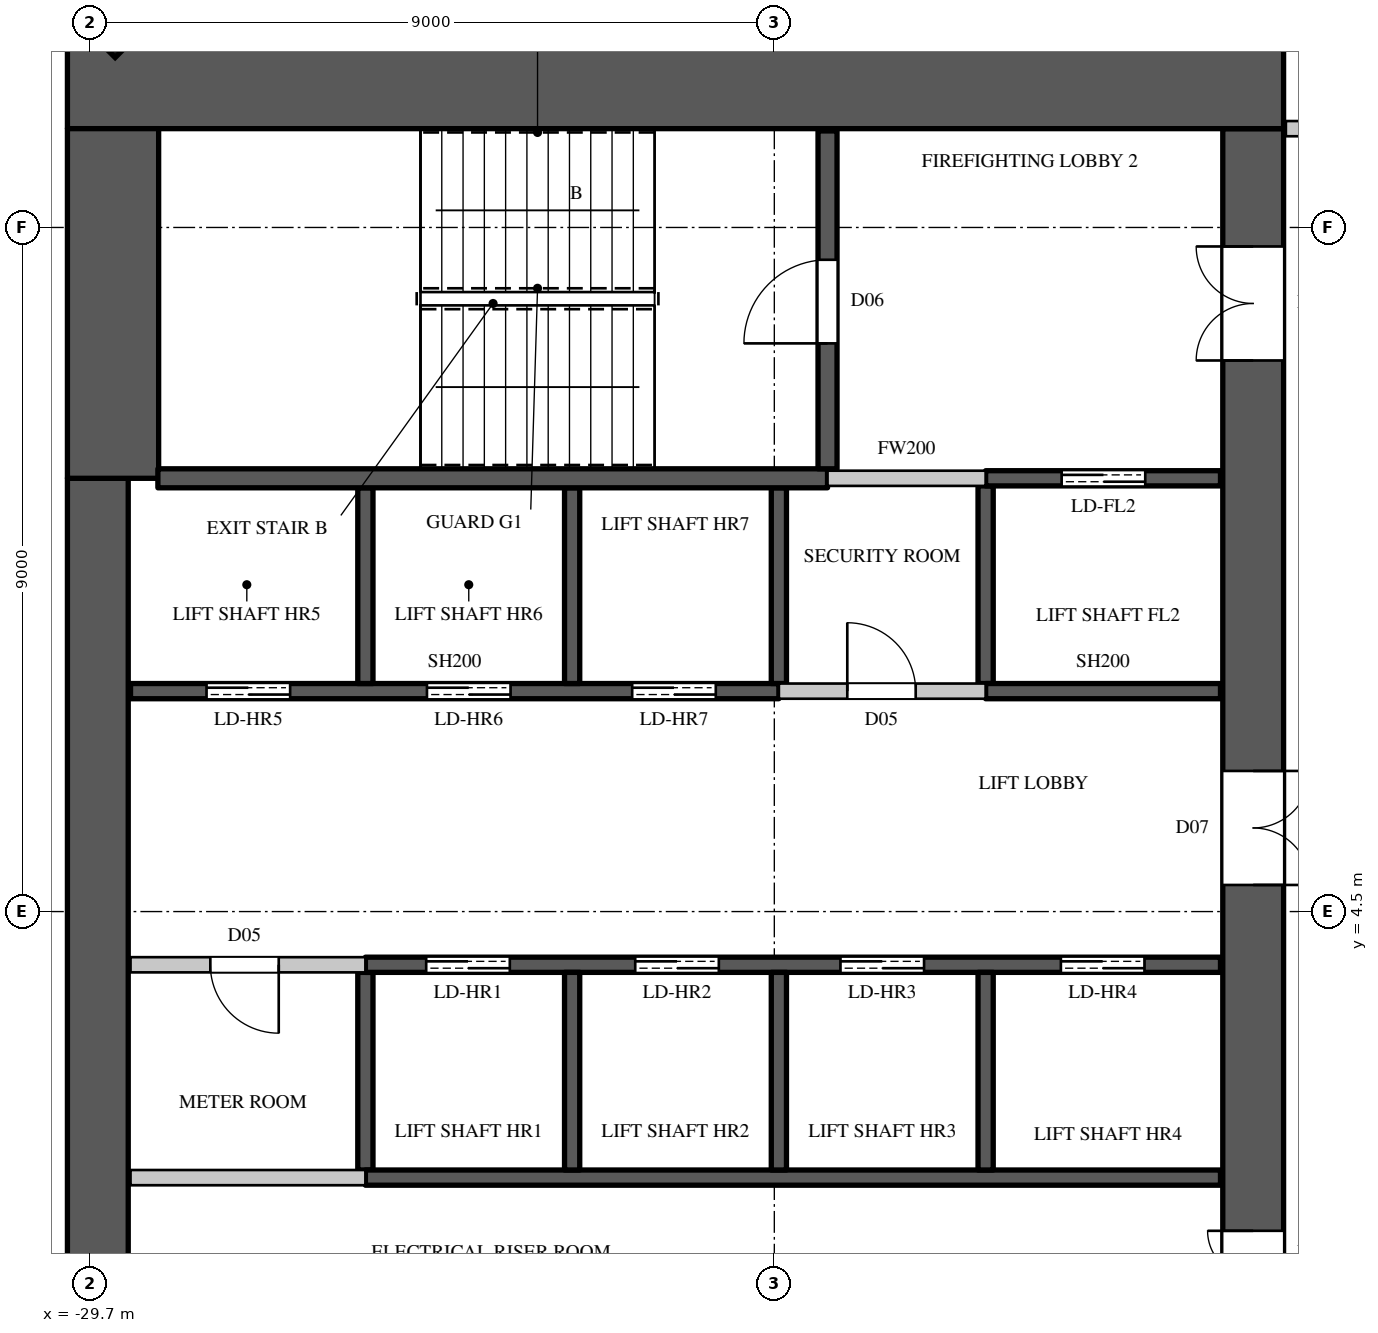
"""IFC4 building model, lengths in metres.
Left out: names, types, materials, properties, quantities, classifications, styles, units other than length and angle.
Written with IfcOpenShell. Run it as: python <this file> out.ifc"""

import sys

from ifc_helpers import new_model, si_unit, direction, frame, frame_2d, origin, origin_2d, place, context, subcontext, project, spatial, rectangle, extrude, element, fill, save


model = new_model("IFC4")
c1 = context("Model", 3, precision=1e-05, world=origin(), true_north=direction((0.0, 1.0)))
c2 = subcontext(c1, "Body", "Model", "MODEL_VIEW")
j1 = project(units=[si_unit("LENGTHUNIT", "METRE"), si_unit("PLANEANGLEUNIT", "RADIAN")], contexts=[c1])
p1 = place(None, origin())
s1 = spatial("IfcSite", under=j1, at=p1, CompositionType="ELEMENT")
p2 = place(p1, origin())
s2 = spatial("IfcBuilding", under=s1, at=p2, CompositionType="ELEMENT")
p3 = place(p2, frame((0.0, 0.0, 209.7)))
s3 = spatial("IfcBuildingStorey", under=s2, at=p3, CompositionType="ELEMENT", Elevation=209.7)
p4 = place(p3, frame((-29.443, 16.443, 0.0), z_axis=(0.0, 0.0, 1.0), x_axis=(-0.707106781187, -0.707106781187, 0.0)))
e1 = element("IfcColumn", 1, at=p4, inside=s3, PredefinedType="COLUMN", context=c2, shape_type="SweptSolid", body=[
    extrude(rectangle(XDim=0.9, YDim=1.1, at=origin_2d()), origin(), (0.0, 0.0, 1.0), 4.1),
])
p5 = place(p3, frame((-30.0, 15.4, 0.0), z_axis=(0.0, 0.0, 1.0), x_axis=(1.0, 0.0, 0.0)))
e2 = element("IfcWall", 2, at=p5, inside=s3, PredefinedType="SHEAR", context=c2, shape_type="SweptSolid", body=[
    extrude(rectangle(XDim=16.0, YDim=1.2, at=frame_2d((8.0, 0.0))), origin(), (0.0, 0.0, 1.0), 4.1),
])
p6 = place(p3, frame((-14.4, -14.8, 0.0), z_axis=(0.0, 0.0, 1.0), x_axis=(0.0, 1.0, 0.0)))
e3 = element("IfcWall", 3, at=p6, inside=s3, PredefinedType="SHEAR", context=c2, shape_type="SweptSolid", body=[
    extrude(rectangle(XDim=29.6, YDim=0.8, at=frame_2d((14.8, 0.0))), origin(), (0.0, 0.0, 1.0), 4.1),
])
p7 = place(p6, frame((1.55, 0.0, 0.0)))
e4 = element("IfcOpeningElement", 4, at=p7, cuts=e3, PredefinedType="OPENING", context=c2, shape_type="SweptSolid", body=[
    extrude(rectangle(XDim=1.5, YDim=2.4, at=frame_2d((0.75, 1.2))), frame((0.0, 0.41, 0.0), z_axis=(0.0, -1.0, 0.0), x_axis=(1.0, 0.0, 0.0)), (0.0, 0.0, 1.0), 0.82),
])
p8 = place(p6, frame((26.55, 0.0, 0.0)))
e5 = element("IfcOpeningElement", 5, at=p8, cuts=e3, PredefinedType="OPENING", context=c2, shape_type="SweptSolid", body=[
    extrude(rectangle(XDim=1.5, YDim=2.4, at=frame_2d((0.75, 1.2))), frame((0.0, 0.41, 0.0), z_axis=(0.0, -1.0, 0.0), x_axis=(1.0, 0.0, 0.0)), (0.0, 0.0, 1.0), 0.82),
])
p9 = place(p6, frame((8.45, 0.0, 0.0)))
e6 = element("IfcOpeningElement", 6, at=p9, cuts=e3, PredefinedType="OPENING", context=c2, shape_type="SweptSolid", body=[
    extrude(rectangle(XDim=1.5, YDim=2.4, at=frame_2d((0.75, 1.2))), frame((0.0, 0.41, 0.0), z_axis=(0.0, -1.0, 0.0), x_axis=(1.0, 0.0, 0.0)), (0.0, 0.0, 1.0), 0.82),
])
p10 = place(p6, frame((19.65, 0.0, 0.0)))
e7 = element("IfcOpeningElement", 7, at=p10, cuts=e3, PredefinedType="OPENING", context=c2, shape_type="SweptSolid", body=[
    extrude(rectangle(XDim=1.5, YDim=2.4, at=frame_2d((0.75, 1.2))), frame((0.0, 0.41, 0.0), z_axis=(0.0, -1.0, 0.0), x_axis=(1.0, 0.0, 0.0)), (0.0, 0.0, 1.0), 0.82),
])
p11 = place(p6, frame((14.5, 0.0, 0.0)))
e8 = element("IfcOpeningElement", 8, at=p11, cuts=e3, PredefinedType="OPENING", context=c2, shape_type="SweptSolid", body=[
    extrude(rectangle(XDim=0.6, YDim=2.0, at=frame_2d((0.3, 1.0))), frame((0.0, 0.41, 0.0), z_axis=(0.0, -1.0, 0.0), x_axis=(1.0, 0.0, 0.0)), (0.0, 0.0, 1.0), 0.82),
])
p12 = place(p3, frame((-29.6, -10.2, 0.0), z_axis=(0.0, 0.0, 1.0), x_axis=(0.0, 1.0, 0.0)))
e9 = element("IfcWall", 9, at=p12, inside=s3, PredefinedType="SHEAR", context=c2, shape_type="SweptSolid", body=[
    extrude(rectangle(XDim=20.4, YDim=0.8, at=frame_2d((10.2, 0.0))), origin(), (0.0, 0.0, 1.0), 4.1),
])
p13 = place(p3, frame((-29.4, 10.2, 0.0), z_axis=(0.0, 0.0, 1.0), x_axis=(0.0, 1.0, 0.0)))
e10 = element("IfcWall", 10, at=p13, inside=s3, PredefinedType="SHEAR", context=c2, shape_type="SweptSolid", body=[
    extrude(rectangle(XDim=4.6, YDim=1.2, at=frame_2d((2.3, 0.0))), origin(), (0.0, 0.0, 1.0), 4.1),
])
p14 = place(p3, frame((-20.64, 7.4, 0.0), z_axis=(0.0, 0.0, 1.0), x_axis=(1.0, 0.0, 0.0)))
e11 = element("IfcWall", 11, at=p14, inside=s3, PredefinedType="PARTITIONING", context=c2, shape_type="SweptSolid", body=[
    extrude(rectangle(XDim=2.72, YDim=0.2, at=frame_2d((1.36, 0.0))), origin(), (0.0, 0.0, 1.0), 3.8),
])
p15 = place(p14, frame((0.9, 0.0, 0.0)))
e12 = element("IfcOpeningElement", 12, at=p15, cuts=e11, PredefinedType="OPENING", context=c2, shape_type="SweptSolid", body=[
    extrude(rectangle(XDim=0.9, YDim=2.2, at=frame_2d((0.45, 1.1))), frame((0.0, 0.11, 0.0), z_axis=(0.0, -1.0, 0.0), x_axis=(1.0, 0.0, 0.0)), (0.0, 0.0, 1.0), 0.22),
])
p16 = place(p3, frame((-20.0, 10.2, 0.0), z_axis=(0.0, 0.0, 1.0), x_axis=(1.0, 0.0, 0.0)))
e13 = element("IfcWall", 13, at=p16, inside=s3, PredefinedType="PARTITIONING", context=c2, shape_type="SweptSolid", body=[
    extrude(rectangle(XDim=2.08, YDim=0.2, at=frame_2d((1.04, 0.0))), origin(), (0.0, 0.0, 1.0), 3.8),
])
p17 = place(p3, frame((-13.97, 14.8, 0.0), z_axis=(0.0, 0.0, 1.0), x_axis=(1.0, 0.0, 0.0)))
e14 = element("IfcWall", 14, at=p17, inside=s3, PredefinedType="PARTITIONING", context=c2, shape_type="SweptSolid", body=[
    extrude(rectangle(XDim=2.87, YDim=0.2, at=frame_2d((1.435, 0.0))), origin(), (0.0, 0.0, 1.0), 3.8),
])
p18 = place(p3, frame((-29.17, 1.0, 0.0), z_axis=(0.0, 0.0, 1.0), x_axis=(1.0, 0.0, 0.0)))
e15 = element("IfcWall", 15, at=p18, inside=s3, PredefinedType="PARTITIONING", context=c2, shape_type="SweptSolid", body=[
    extrude(rectangle(XDim=3.09, YDim=0.2, at=frame_2d((1.545, 0.0))), origin(), (0.0, 0.0, 1.0), 3.8),
])
p19 = place(p3, frame((-29.17, 3.8, 0.0), z_axis=(0.0, 0.0, 1.0), x_axis=(1.0, 0.0, 0.0)))
e16 = element("IfcWall", 16, at=p19, inside=s3, PredefinedType="PARTITIONING", context=c2, shape_type="SweptSolid", body=[
    extrude(rectangle(XDim=3.09, YDim=0.2, at=frame_2d((1.545, 0.0))), origin(), (0.0, 0.0, 1.0), 3.8),
])
p20 = place(p19, frame((1.05, 0.0, 0.0)))
e17 = element("IfcOpeningElement", 17, at=p20, cuts=e16, PredefinedType="OPENING", context=c2, shape_type="SweptSolid", body=[
    extrude(rectangle(XDim=0.9, YDim=2.2, at=frame_2d((0.45, 1.1))), frame((0.0, 0.11, 0.0), z_axis=(0.0, -1.0, 0.0), x_axis=(1.0, 0.0, 0.0)), (0.0, 0.0, 1.0), 0.22),
])
p21 = place(p3, frame((-29.17, 7.4, 0.0), z_axis=(0.0, 0.0, 1.0), x_axis=(1.0, 0.0, 0.0)))
e18 = element("IfcWall", 18, at=p21, inside=s3, PredefinedType="SHEAR", context=c2, shape_type="SweptSolid", body=[
    extrude(rectangle(XDim=8.53, YDim=0.2, at=frame_2d((4.265, 0.0))), origin(), (0.0, 0.0, 1.0), 3.8),
])
p22 = place(p21, frame((1.0, 0.0, 0.0)))
e19 = element("IfcOpeningElement", 19, at=p22, cuts=e18, PredefinedType="OPENING", context=c2, shape_type="SweptSolid", body=[
    extrude(rectangle(XDim=1.1, YDim=2.2, at=frame_2d((0.55, 1.1))), frame((0.0, 0.11, 0.0), z_axis=(0.0, -1.0, 0.0), x_axis=(1.0, 0.0, 0.0)), (0.0, 0.0, 1.0), 0.22),
])
p23 = place(p21, frame((3.9, 0.0, 0.0)))
e20 = element("IfcOpeningElement", 20, at=p23, cuts=e18, PredefinedType="OPENING", context=c2, shape_type="SweptSolid", body=[
    extrude(rectangle(XDim=1.1, YDim=2.2, at=frame_2d((0.55, 1.1))), frame((0.0, 0.11, 0.0), z_axis=(0.0, -1.0, 0.0), x_axis=(1.0, 0.0, 0.0)), (0.0, 0.0, 1.0), 0.22),
])
p24 = place(p21, frame((6.6, 0.0, 0.0)))
e21 = element("IfcOpeningElement", 21, at=p24, cuts=e18, PredefinedType="OPENING", context=c2, shape_type="SweptSolid", body=[
    extrude(rectangle(XDim=1.1, YDim=2.2, at=frame_2d((0.55, 1.1))), frame((0.0, 0.11, 0.0), z_axis=(0.0, -1.0, 0.0), x_axis=(1.0, 0.0, 0.0)), (0.0, 0.0, 1.0), 0.22),
])
p25 = place(p3, frame((-26.08, 1.1, 0.0), z_axis=(0.0, 0.0, 1.0), x_axis=(0.0, 1.0, 0.0)))
e22 = element("IfcWall", 22, at=p25, inside=s3, PredefinedType="SHEAR", context=c2, shape_type="SweptSolid", body=[
    extrude(rectangle(XDim=2.6, YDim=0.2, at=frame_2d((1.3, 0.0))), origin(), (0.0, 0.0, 1.0), 3.8),
])
p26 = place(p3, frame((-26.08, 1.0, 0.0), z_axis=(0.0, 0.0, 1.0), x_axis=(1.0, 0.0, 0.0)))
e23 = element("IfcWall", 23, at=p26, inside=s3, PredefinedType="SHEAR", context=c2, shape_type="SweptSolid", body=[
    extrude(rectangle(XDim=11.25, YDim=0.2, at=frame_2d((5.625, 0.0))), origin(), (0.0, 0.0, 1.0), 3.8),
])
p27 = place(p3, frame((-26.08, 3.8, 0.0), z_axis=(0.0, 0.0, 1.0), x_axis=(1.0, 0.0, 0.0)))
e24 = element("IfcWall", 24, at=p27, inside=s3, PredefinedType="SHEAR", context=c2, shape_type="SweptSolid", body=[
    extrude(rectangle(XDim=11.25, YDim=0.2, at=frame_2d((5.625, 0.0))), origin(), (0.0, 0.0, 1.0), 3.8),
])
p28 = place(p27, frame((0.8, 0.0, 0.0)))
e25 = element("IfcOpeningElement", 25, at=p28, cuts=e24, PredefinedType="OPENING", context=c2, shape_type="SweptSolid", body=[
    extrude(rectangle(XDim=1.1, YDim=2.2, at=frame_2d((0.55, 1.1))), frame((0.0, 0.11, 0.0), z_axis=(0.0, -1.0, 0.0), x_axis=(1.0, 0.0, 0.0)), (0.0, 0.0, 1.0), 0.22),
])
p29 = place(p27, frame((3.55, 0.0, 0.0)))
e26 = element("IfcOpeningElement", 26, at=p29, cuts=e24, PredefinedType="OPENING", context=c2, shape_type="SweptSolid", body=[
    extrude(rectangle(XDim=1.1, YDim=2.2, at=frame_2d((0.55, 1.1))), frame((0.0, 0.11, 0.0), z_axis=(0.0, -1.0, 0.0), x_axis=(1.0, 0.0, 0.0)), (0.0, 0.0, 1.0), 0.22),
])
p30 = place(p27, frame((6.25, 0.0, 0.0)))
e27 = element("IfcOpeningElement", 27, at=p30, cuts=e24, PredefinedType="OPENING", context=c2, shape_type="SweptSolid", body=[
    extrude(rectangle(XDim=1.1, YDim=2.2, at=frame_2d((0.55, 1.1))), frame((0.0, 0.11, 0.0), z_axis=(0.0, -1.0, 0.0), x_axis=(1.0, 0.0, 0.0)), (0.0, 0.0, 1.0), 0.22),
])
p31 = place(p27, frame((9.15, 0.0, 0.0)))
e28 = element("IfcOpeningElement", 28, at=p31, cuts=e24, PredefinedType="OPENING", context=c2, shape_type="SweptSolid", body=[
    extrude(rectangle(XDim=1.1, YDim=2.2, at=frame_2d((0.55, 1.1))), frame((0.0, 0.11, 0.0), z_axis=(0.0, -1.0, 0.0), x_axis=(1.0, 0.0, 0.0)), (0.0, 0.0, 1.0), 0.22),
])
p32 = place(p3, frame((-26.08, 7.5, 0.0), z_axis=(0.0, 0.0, 1.0), x_axis=(0.0, 1.0, 0.0)))
e29 = element("IfcWall", 29, at=p32, inside=s3, PredefinedType="SHEAR", context=c2, shape_type="SweptSolid", body=[
    extrude(rectangle(XDim=2.575, YDim=0.2, at=frame_2d((1.288, 0.0))), origin(), (0.0, 0.0, 1.0), 4.1),
])
p33 = place(p3, frame((-23.36, 1.1, 0.0), z_axis=(0.0, 0.0, 1.0), x_axis=(0.0, 1.0, 0.0)))
e30 = element("IfcWall", 30, at=p33, inside=s3, PredefinedType="SHEAR", context=c2, shape_type="SweptSolid", body=[
    extrude(rectangle(XDim=2.6, YDim=0.2, at=frame_2d((1.3, 0.0))), origin(), (0.0, 0.0, 1.0), 4.1),
])
p34 = place(p3, frame((-23.36, 7.5, 0.0), z_axis=(0.0, 0.0, 1.0), x_axis=(0.0, 1.0, 0.0)))
e31 = element("IfcWall", 31, at=p34, inside=s3, PredefinedType="SHEAR", context=c2, shape_type="SweptSolid", body=[
    extrude(rectangle(XDim=2.575, YDim=0.2, at=frame_2d((1.288, 0.0))), origin(), (0.0, 0.0, 1.0), 4.1),
])
p35 = place(p3, frame((-20.64, 1.1, 0.0), z_axis=(0.0, 0.0, 1.0), x_axis=(0.0, 1.0, 0.0)))
e32 = element("IfcWall", 32, at=p35, inside=s3, PredefinedType="SHEAR", context=c2, shape_type="SweptSolid", body=[
    extrude(rectangle(XDim=2.6, YDim=0.2, at=frame_2d((1.3, 0.0))), origin(), (0.0, 0.0, 1.0), 4.1),
])
p36 = place(p3, frame((-20.64, 7.5, 0.0), z_axis=(0.0, 0.0, 1.0), x_axis=(0.0, 1.0, 0.0)))
e33 = element("IfcWall", 33, at=p36, inside=s3, PredefinedType="SHEAR", context=c2, shape_type="SweptSolid", body=[
    extrude(rectangle(XDim=2.575, YDim=0.2, at=frame_2d((1.288, 0.0))), origin(), (0.0, 0.0, 1.0), 3.8),
])
p37 = place(p3, frame((-17.92, 1.1, 0.0), z_axis=(0.0, 0.0, 1.0), x_axis=(0.0, 1.0, 0.0)))
e34 = element("IfcWall", 34, at=p37, inside=s3, PredefinedType="SHEAR", context=c2, shape_type="SweptSolid", body=[
    extrude(rectangle(XDim=2.6, YDim=0.2, at=frame_2d((1.3, 0.0))), origin(), (0.0, 0.0, 1.0), 4.1),
])
p38 = place(p3, frame((-17.92, 7.5, 0.0), z_axis=(0.0, 0.0, 1.0), x_axis=(0.0, 1.0, 0.0)))
e35 = element("IfcWall", 35, at=p38, inside=s3, PredefinedType="SHEAR", context=c2, shape_type="SweptSolid", body=[
    extrude(rectangle(XDim=2.6, YDim=0.2, at=frame_2d((1.3, 0.0))), origin(), (0.0, 0.0, 1.0), 3.8),
])
p39 = place(p3, frame((-17.92, 7.4, 0.0), z_axis=(0.0, 0.0, 1.0), x_axis=(1.0, 0.0, 0.0)))
e36 = element("IfcWall", 36, at=p39, inside=s3, PredefinedType="SHEAR", context=c2, shape_type="SweptSolid", body=[
    extrude(rectangle(XDim=3.09, YDim=0.2, at=frame_2d((1.545, 0.0))), origin(), (0.0, 0.0, 1.0), 3.8),
])
p40 = place(p3, frame((-17.92, 10.2, 0.0), z_axis=(0.0, 0.0, 1.0), x_axis=(1.0, 0.0, 0.0)))
e37 = element("IfcWall", 37, at=p40, inside=s3, PredefinedType="SHEAR", context=c2, shape_type="SweptSolid", body=[
    extrude(rectangle(XDim=3.09, YDim=0.2, at=frame_2d((1.545, 0.0))), origin(), (0.0, 0.0, 1.0), 3.8),
])
p41 = place(p40, frame((1.0, 0.0, 0.0)))
e38 = element("IfcOpeningElement", 38, at=p41, cuts=e37, PredefinedType="OPENING", context=c2, shape_type="SweptSolid", body=[
    extrude(rectangle(XDim=1.1, YDim=2.2, at=frame_2d((0.55, 1.1))), frame((0.0, 0.11, 0.0), z_axis=(0.0, -1.0, 0.0), x_axis=(1.0, 0.0, 0.0)), (0.0, 0.0, 1.0), 0.22),
])
p42 = place(p3, frame((-28.81, 10.2, 0.0), z_axis=(0.0, 0.0, 1.0), x_axis=(1.0, 0.0, 0.0)))
e39 = element("IfcWall", 39, at=p42, inside=s3, PredefinedType="SHEAR", context=c2, shape_type="SweptSolid", body=[
    extrude(rectangle(XDim=8.81, YDim=0.25, at=frame_2d((4.405, 0.0))), origin(), (0.0, 0.0, 1.0), 3.8),
])
p43 = place(p3, frame((-20.0, 10.325, 0.0), z_axis=(0.0, 0.0, 1.0), x_axis=(0.0, 1.0, 0.0)))
e40 = element("IfcWall", 40, at=p43, inside=s3, PredefinedType="SHEAR", context=c2, shape_type="SweptSolid", body=[
    extrude(rectangle(XDim=4.445, YDim=0.25, at=frame_2d((2.223, 0.0))), origin(), (0.0, 0.0, 1.0), 3.8),
])
p44 = place(p43, frame((1.65, 0.0, 0.0)))
e41 = element("IfcOpeningElement", 41, at=p44, cuts=e40, PredefinedType="OPENING", context=c2, shape_type="SweptSolid", body=[
    extrude(rectangle(XDim=1.1, YDim=2.2, at=frame_2d((0.55, 1.1))), frame((0.0, 0.135, 0.0), z_axis=(0.0, -1.0, 0.0), x_axis=(1.0, 0.0, 0.0)), (0.0, 0.0, 1.0), 0.27),
])
p45 = place(p44, origin())
e42 = element("IfcDoor", 42, at=p45, inside=s3, OperationType="SINGLE_SWING_LEFT", PredefinedType="DOOR", context=c2, shape_type="SweptSolid", body=[
    extrude(rectangle(XDim=1.1, YDim=2.2, at=frame_2d((0.55, 1.1))), frame((0.0, 0.025, 0.0), z_axis=(0.0, -1.0, 0.0), x_axis=(1.0, 0.0, 0.0)), (0.0, 0.0, 1.0), 0.05),
])
fill(e41, e42)
p46 = place(p20, origin())
e43 = element("IfcDoor", 43, at=p46, inside=s3, OperationType="SINGLE_SWING_LEFT", PredefinedType="DOOR", context=c2, shape_type="SweptSolid", body=[
    extrude(rectangle(XDim=0.9, YDim=2.2, at=frame_2d((0.45, 1.1))), frame((0.0, 0.025, 0.0), z_axis=(0.0, -1.0, 0.0), x_axis=(1.0, 0.0, 0.0)), (0.0, 0.0, 1.0), 0.05),
])
fill(e17, e43)
p47 = place(p15, origin())
e44 = element("IfcDoor", 44, at=p47, inside=s3, OperationType="SINGLE_SWING_LEFT", PredefinedType="DOOR", context=c2, shape_type="SweptSolid", body=[
    extrude(rectangle(XDim=0.9, YDim=2.2, at=frame_2d((0.45, 1.1))), frame((0.0, 0.025, 0.0), z_axis=(0.0, -1.0, 0.0), x_axis=(1.0, 0.0, 0.0)), (0.0, 0.0, 1.0), 0.05),
])
fill(e12, e44)
p48 = place(p28, origin())
e45 = element("IfcDoor", 45, at=p48, inside=s3, OperationType="DOUBLE_DOOR_SLIDING", PredefinedType="DOOR", context=c2, shape_type="SweptSolid", body=[
    extrude(rectangle(XDim=1.1, YDim=2.2, at=frame_2d((0.55, 1.1))), frame((0.0, 0.025, 0.0), z_axis=(0.0, -1.0, 0.0), x_axis=(1.0, 0.0, 0.0)), (0.0, 0.0, 1.0), 0.05),
])
fill(e25, e45)
p49 = place(p29, origin())
e46 = element("IfcDoor", 46, at=p49, inside=s3, OperationType="DOUBLE_DOOR_SLIDING", PredefinedType="DOOR", context=c2, shape_type="SweptSolid", body=[
    extrude(rectangle(XDim=1.1, YDim=2.2, at=frame_2d((0.55, 1.1))), frame((0.0, 0.025, 0.0), z_axis=(0.0, -1.0, 0.0), x_axis=(1.0, 0.0, 0.0)), (0.0, 0.0, 1.0), 0.05),
])
fill(e26, e46)
p50 = place(p30, origin())
e47 = element("IfcDoor", 47, at=p50, inside=s3, OperationType="DOUBLE_DOOR_SLIDING", PredefinedType="DOOR", context=c2, shape_type="SweptSolid", body=[
    extrude(rectangle(XDim=1.1, YDim=2.2, at=frame_2d((0.55, 1.1))), frame((0.0, 0.025, 0.0), z_axis=(0.0, -1.0, 0.0), x_axis=(1.0, 0.0, 0.0)), (0.0, 0.0, 1.0), 0.05),
])
fill(e27, e47)
p51 = place(p31, origin())
e48 = element("IfcDoor", 48, at=p51, inside=s3, OperationType="DOUBLE_DOOR_SLIDING", PredefinedType="DOOR", context=c2, shape_type="SweptSolid", body=[
    extrude(rectangle(XDim=1.1, YDim=2.2, at=frame_2d((0.55, 1.1))), frame((0.0, 0.025, 0.0), z_axis=(0.0, -1.0, 0.0), x_axis=(1.0, 0.0, 0.0)), (0.0, 0.0, 1.0), 0.05),
])
fill(e28, e48)
p52 = place(p22, origin())
e49 = element("IfcDoor", 49, at=p52, inside=s3, OperationType="DOUBLE_DOOR_SLIDING", PredefinedType="DOOR", context=c2, shape_type="SweptSolid", body=[
    extrude(rectangle(XDim=1.1, YDim=2.2, at=frame_2d((0.55, 1.1))), frame((0.0, 0.025, 0.0), z_axis=(0.0, -1.0, 0.0), x_axis=(1.0, 0.0, 0.0)), (0.0, 0.0, 1.0), 0.05),
])
fill(e19, e49)
p53 = place(p23, origin())
e50 = element("IfcDoor", 50, at=p53, inside=s3, OperationType="DOUBLE_DOOR_SLIDING", PredefinedType="DOOR", context=c2, shape_type="SweptSolid", body=[
    extrude(rectangle(XDim=1.1, YDim=2.2, at=frame_2d((0.55, 1.1))), frame((0.0, 0.025, 0.0), z_axis=(0.0, -1.0, 0.0), x_axis=(1.0, 0.0, 0.0)), (0.0, 0.0, 1.0), 0.05),
])
fill(e20, e50)
p54 = place(p24, origin())
e51 = element("IfcDoor", 51, at=p54, inside=s3, OperationType="DOUBLE_DOOR_SLIDING", PredefinedType="DOOR", context=c2, shape_type="SweptSolid", body=[
    extrude(rectangle(XDim=1.1, YDim=2.2, at=frame_2d((0.55, 1.1))), frame((0.0, 0.025, 0.0), z_axis=(0.0, -1.0, 0.0), x_axis=(1.0, 0.0, 0.0)), (0.0, 0.0, 1.0), 0.05),
])
fill(e21, e51)
p55 = place(p41, origin())
e52 = element("IfcDoor", 52, at=p55, inside=s3, OperationType="DOUBLE_DOOR_SLIDING", PredefinedType="DOOR", context=c2, shape_type="SweptSolid", body=[
    extrude(rectangle(XDim=1.1, YDim=2.2, at=frame_2d((0.55, 1.1))), frame((0.0, 0.025, 0.0), z_axis=(0.0, -1.0, 0.0), x_axis=(1.0, 0.0, 0.0)), (0.0, 0.0, 1.0), 0.05),
])
fill(e38, e52)
p56 = place(p8, origin())
e53 = element("IfcDoor", 53, at=p56, inside=s3, OperationType="DOUBLE_DOOR_SINGLE_SWING", PredefinedType="DOOR", context=c2, shape_type="SweptSolid", body=[
    extrude(rectangle(XDim=1.5, YDim=2.4, at=frame_2d((0.75, 1.2))), frame((0.0, 0.395, 0.0), z_axis=(0.0, -1.0, 0.0), x_axis=(1.0, 0.0, 0.0)), (0.0, 0.0, 1.0), 0.05),
])
fill(e5, e53)
p57 = place(p10, origin())
e54 = element("IfcDoor", 54, at=p57, inside=s3, OperationType="DOUBLE_DOOR_SINGLE_SWING", PredefinedType="DOOR", context=c2, shape_type="SweptSolid", body=[
    extrude(rectangle(XDim=1.5, YDim=2.4, at=frame_2d((0.75, 1.2))), frame((0.0, -0.345, 0.0), z_axis=(0.0, -1.0, 0.0), x_axis=(1.0, 0.0, 0.0)), (0.0, 0.0, 1.0), 0.05),
])
fill(e7, e54)
p58 = place(p11, origin())
e55 = element("IfcDoor", 55, at=p58, inside=s3, OperationType="SINGLE_SWING_RIGHT", PredefinedType="DOOR", context=c2, shape_type="SweptSolid", body=[
    extrude(rectangle(XDim=0.6, YDim=2.0, at=frame_2d((0.3, 1.0))), frame((0.0, 0.395, 0.0), z_axis=(0.0, -1.0, 0.0), x_axis=(1.0, 0.0, 0.0)), (0.0, 0.0, 1.0), 0.05),
])
fill(e8, e55)
save(model, sys.argv[1])
